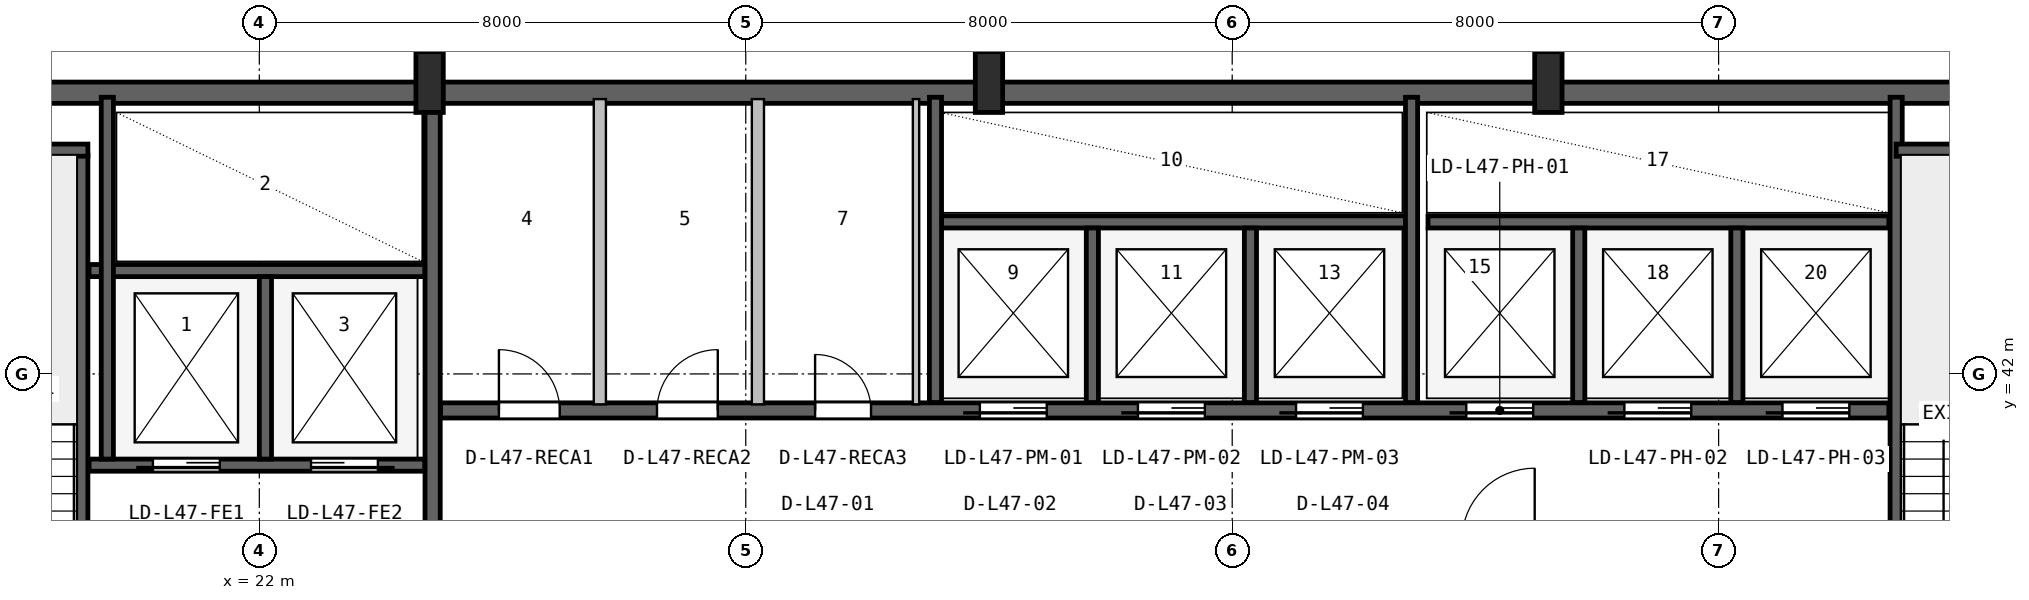
"""IFC4 building model, lengths in metres.
Left out: names, types, materials, properties, quantities, classifications, styles, units other than length and angle.
Written with IfcOpenShell. Run it as: python <this file> out.ifc"""

import sys

from ifc_helpers import new_model, si_unit, direction, frame, frame_2d, origin, origin_2d, place, context, subcontext, project, spatial, rectangle, i_section, extrude, source, transform, mapped, element, fill, save


model = new_model("IFC4")
c1 = context("Model", 3, precision=1e-05, world=origin(), true_north=direction((0.0, 1.0)))
c2 = subcontext(c1, "Body", "Model", "MODEL_VIEW")
j1 = project(units=[si_unit("LENGTHUNIT", "METRE"), si_unit("PLANEANGLEUNIT", "RADIAN")], contexts=[c1])
p1 = place(None, origin())
s1 = spatial("IfcSite", under=j1, at=p1, CompositionType="ELEMENT")
p2 = place(p1, origin())
s2 = spatial("IfcBuilding", under=s1, at=p2, CompositionType="ELEMENT")
p3 = place(p2, frame((0.0, 0.0, 191.4)))
s3 = spatial("IfcBuildingStorey", under=s2, at=p3, CompositionType="ELEMENT", Elevation=191.4)
p4 = place(p3, frame((15.6, 46.625, 0.0), z_axis=(0.0, 0.0, 1.0), x_axis=(1.0, 0.0, 0.0)))
e1 = element("IfcWall", 1, at=p4, inside=s3, PredefinedType="SHEAR", context=c2, shape_type="SweptSolid", body=[
    extrude(rectangle(XDim=36.8, YDim=0.35, at=frame_2d((18.4, 0.0))), origin(), (0.0, 0.0, 1.0), 4.35),
])
m1 = source(origin(), c2, "Body", "SweptSolid", [
    extrude(i_section(OverallWidth=0.45, OverallDepth=1.0, WebThickness=0.016, FlangeThickness=0.03, FilletRadius=0.016, at=origin_2d()), origin(), (0.0, 0.0, 1.0), 4.6),
])
for number, where, z_axis, x_axis in (
    (2, (24.8, 46.8, 0.0), (0.0, 0.0, 1.0), (1.0, 0.0, 0.0)),
    (3, (34.0, 46.8, 0.0), (0.0, 0.0, 1.0), (1.0, 0.0, 0.0)),
    (4, (43.2, 46.8, 0.0), (0.0, 0.0, 1.0), (1.0, 0.0, 0.0)),
):
    element("IfcColumn", number, at=place(p3, frame(where, z_axis=z_axis, x_axis=x_axis)), inside=s3, PredefinedType="COLUMN", context=c2, shape_type="MappedRepresentation", body=[
        mapped(m1, transform((0.0, 0.0, 0.0), x_axis=(1.0, 0.0, 0.0), y_axis=(0.0, 1.0, 0.0), z_axis=(0.0, 0.0, 1.0), scale=1.0)),
    ])
p5 = place(p3, frame((19.08, 35.95, 0.0), z_axis=(0.0, 0.0, 1.0), x_axis=(0.0, 1.0, 0.0)))
e5 = element("IfcWall", 5, at=p5, inside=s3, PredefinedType="SHEAR", context=c2, shape_type="SweptSolid", body=[
    extrude(rectangle(XDim=9.65, YDim=0.2, at=frame_2d((4.825, 0.0))), origin(), (0.0, 0.0, 1.0), 4.35),
])
p6 = place(p5, frame((0.25, 0.0, 0.0)))
e6 = element("IfcOpeningElement", 6, at=p6, cuts=e5, PredefinedType="OPENING", context=c2, shape_type="SweptSolid", body=[
    extrude(rectangle(XDim=0.95, YDim=2.1, at=frame_2d((0.475, 1.05))), frame((0.0, 0.11, 0.0), z_axis=(0.0, -1.0, 0.0), x_axis=(1.0, 0.0, 0.0)), (0.0, 0.0, 1.0), 0.22),
])
p7 = place(p3, frame((15.95, 45.68, 0.0), z_axis=(0.0, 0.0, 1.0), x_axis=(1.0, 0.0, 0.0)))
e7 = element("IfcWall", 7, at=p7, inside=s3, PredefinedType="SHEAR", context=c2, shape_type="SweptSolid", body=[
    extrude(rectangle(XDim=3.23, YDim=0.2, at=frame_2d((1.615, 0.0))), origin(), (0.0, 0.0, 1.0), 4.35),
])
p8 = place(p3, frame((24.85, 36.05, 0.0), z_axis=(0.0, 0.0, 1.0), x_axis=(0.0, 1.0, 0.0)))
e8 = element("IfcWall", 8, at=p8, inside=s3, PredefinedType="SHEAR", context=c2, shape_type="SweptSolid", body=[
    extrude(rectangle(XDim=10.45, YDim=0.25, at=frame_2d((5.225, 0.0))), origin(), (0.0, 0.0, 1.0), 4.35),
])
p9 = place(p3, frame((19.2, 40.5, 0.0), z_axis=(0.0, 0.0, 1.0), x_axis=(1.0, 0.0, 0.0)))
e9 = element("IfcWall", 9, at=p9, inside=s3, PredefinedType="SHEAR", context=c2, shape_type="SweptSolid", body=[
    extrude(rectangle(XDim=5.52, YDim=0.2, at=frame_2d((2.76, 0.0))), origin(), (0.0, 0.0, 1.0), 4.35),
])
p10 = place(p9, frame((1.05, 0.0, 0.0)))
e10 = element("IfcOpeningElement", 10, at=p10, cuts=e9, PredefinedType="OPENING", context=c2, shape_type="SweptSolid", body=[
    extrude(rectangle(XDim=1.1, YDim=2.18, at=frame_2d((0.55, 1.09))), frame((0.0, 0.11, 0.0), z_axis=(0.0, -1.0, 0.0), x_axis=(1.0, 0.0, 0.0)), (0.0, 0.0, 1.0), 0.22),
])
p11 = place(p9, frame((3.65, 0.0, 0.0)))
e11 = element("IfcOpeningElement", 11, at=p11, cuts=e9, PredefinedType="OPENING", context=c2, shape_type="SweptSolid", body=[
    extrude(rectangle(XDim=1.1, YDim=2.18, at=frame_2d((0.55, 1.09))), frame((0.0, 0.11, 0.0), z_axis=(0.0, -1.0, 0.0), x_axis=(1.0, 0.0, 0.0)), (0.0, 0.0, 1.0), 0.22),
])
p12 = place(p3, frame((19.2, 43.7, 0.0), z_axis=(0.0, 0.0, 1.0), x_axis=(1.0, 0.0, 0.0)))
e12 = element("IfcWall", 12, at=p12, inside=s3, PredefinedType="SHEAR", context=c2, shape_type="SweptSolid", body=[
    extrude(rectangle(XDim=5.52, YDim=0.2, at=frame_2d((2.76, 0.0))), origin(), (0.0, 0.0, 1.0), 4.35),
])
p13 = place(p3, frame((22.1, 40.6, 0.0), z_axis=(0.0, 0.0, 1.0), x_axis=(0.0, 1.0, 0.0)))
e13 = element("IfcWall", 13, at=p13, inside=s3, PredefinedType="SHEAR", context=c2, shape_type="SweptSolid", body=[
    extrude(rectangle(XDim=3.0, YDim=0.2, at=frame_2d((1.5, 0.0))), origin(), (0.0, 0.0, 1.0), 4.35),
])
p14 = place(p3, frame((19.5, 40.6, 0.0), z_axis=(0.0, 0.0, 1.0), x_axis=(0.0, 1.0, 0.0)))
e14 = element("IfcWall", 14, at=p14, inside=s3, PredefinedType="SHEAR", context=c2, shape_type="SweptSolid", body=[
    extrude(rectangle(XDim=5.95, YDim=0.2, at=frame_2d((2.975, 0.0))), origin(), (0.0, 0.0, 1.0), 4.35),
])
p15 = place(p3, frame((48.92, 36.05, 0.0), z_axis=(0.0, 0.0, 1.0), x_axis=(0.0, 1.0, 0.0)))
e15 = element("IfcWall", 15, at=p15, inside=s3, PredefinedType="SHEAR", context=c2, shape_type="SweptSolid", body=[
    extrude(rectangle(XDim=10.5, YDim=0.2, at=frame_2d((5.25, 0.0))), origin(), (0.0, 0.0, 1.0), 4.35),
])
p16 = place(p3, frame((48.92, 45.68, 0.0), z_axis=(0.0, 0.0, 1.0), x_axis=(1.0, 0.0, 0.0)))
e16 = element("IfcWall", 16, at=p16, inside=s3, PredefinedType="SHEAR", context=c2, shape_type="SweptSolid", body=[
    extrude(rectangle(XDim=3.18, YDim=0.2, at=frame_2d((1.59, 0.0))), origin(), (0.0, 0.0, 1.0), 4.35),
])
p17 = place(p3, frame((24.98, 41.4, 0.0), z_axis=(0.0, 0.0, 1.0), x_axis=(1.0, 0.0, 0.0)))
e17 = element("IfcWall", 17, at=p17, inside=s3, PredefinedType="SHEAR", context=c2, shape_type="SweptSolid", body=[
    extrude(rectangle(XDim=23.82, YDim=0.25, at=frame_2d((11.91, 0.0))), origin(), (0.0, 0.0, 1.0), 4.35),
])
p18 = place(p17, frame((8.87, 0.0, 0.0)))
e18 = element("IfcOpeningElement", 18, at=p18, cuts=e17, PredefinedType="OPENING", context=c2, shape_type="SweptSolid", body=[
    extrude(rectangle(XDim=1.1, YDim=2.18, at=frame_2d((0.55, 1.09))), frame((0.0, 0.135, 0.0), z_axis=(0.0, -1.0, 0.0), x_axis=(1.0, 0.0, 0.0)), (0.0, 0.0, 1.0), 0.27),
])
p19 = place(p17, frame((11.47, 0.0, 0.0)))
e19 = element("IfcOpeningElement", 19, at=p19, cuts=e17, PredefinedType="OPENING", context=c2, shape_type="SweptSolid", body=[
    extrude(rectangle(XDim=1.1, YDim=2.18, at=frame_2d((0.55, 1.09))), frame((0.0, 0.135, 0.0), z_axis=(0.0, -1.0, 0.0), x_axis=(1.0, 0.0, 0.0)), (0.0, 0.0, 1.0), 0.27),
])
p20 = place(p17, frame((14.07, 0.0, 0.0)))
e20 = element("IfcOpeningElement", 20, at=p20, cuts=e17, PredefinedType="OPENING", context=c2, shape_type="SweptSolid", body=[
    extrude(rectangle(XDim=1.1, YDim=2.18, at=frame_2d((0.55, 1.09))), frame((0.0, 0.135, 0.0), z_axis=(0.0, -1.0, 0.0), x_axis=(1.0, 0.0, 0.0)), (0.0, 0.0, 1.0), 0.27),
])
p21 = place(p17, frame((16.87, 0.0, 0.0)))
e21 = element("IfcOpeningElement", 21, at=p21, cuts=e17, PredefinedType="OPENING", context=c2, shape_type="SweptSolid", body=[
    extrude(rectangle(XDim=1.1, YDim=2.18, at=frame_2d((0.55, 1.09))), frame((0.0, 0.135, 0.0), z_axis=(0.0, -1.0, 0.0), x_axis=(1.0, 0.0, 0.0)), (0.0, 0.0, 1.0), 0.27),
])
p22 = place(p17, frame((19.47, 0.0, 0.0)))
e22 = element("IfcOpeningElement", 22, at=p22, cuts=e17, PredefinedType="OPENING", context=c2, shape_type="SweptSolid", body=[
    extrude(rectangle(XDim=1.1, YDim=2.18, at=frame_2d((0.55, 1.09))), frame((0.0, 0.135, 0.0), z_axis=(0.0, -1.0, 0.0), x_axis=(1.0, 0.0, 0.0)), (0.0, 0.0, 1.0), 0.27),
])
p23 = place(p17, frame((22.07, 0.0, 0.0)))
e23 = element("IfcOpeningElement", 23, at=p23, cuts=e17, PredefinedType="OPENING", context=c2, shape_type="SweptSolid", body=[
    extrude(rectangle(XDim=1.1, YDim=2.18, at=frame_2d((0.55, 1.09))), frame((0.0, 0.135, 0.0), z_axis=(0.0, -1.0, 0.0), x_axis=(1.0, 0.0, 0.0)), (0.0, 0.0, 1.0), 0.27),
])
p24 = place(p17, frame((0.96, 0.0, 0.0)))
e24 = element("IfcOpeningElement", 24, at=p24, cuts=e17, PredefinedType="OPENING", context=c2, shape_type="SweptSolid", body=[
    extrude(rectangle(XDim=1.0, YDim=2.08, at=frame_2d((0.5, 1.04))), frame((0.0, 0.135, 0.0), z_axis=(0.0, -1.0, 0.0), x_axis=(1.0, 0.0, 0.0)), (0.0, 0.0, 1.0), 0.27),
])
p25 = place(p17, frame((3.56, 0.0, 0.0)))
e25 = element("IfcOpeningElement", 25, at=p25, cuts=e17, PredefinedType="OPENING", context=c2, shape_type="SweptSolid", body=[
    extrude(rectangle(XDim=1.0, YDim=2.08, at=frame_2d((0.5, 1.04))), frame((0.0, 0.135, 0.0), z_axis=(0.0, -1.0, 0.0), x_axis=(1.0, 0.0, 0.0)), (0.0, 0.0, 1.0), 0.27),
])
p26 = place(p17, frame((6.16, 0.0, 0.0)))
e26 = element("IfcOpeningElement", 26, at=p26, cuts=e17, PredefinedType="OPENING", context=c2, shape_type="SweptSolid", body=[
    extrude(rectangle(XDim=0.92, YDim=2.08, at=frame_2d((0.46, 1.04))), frame((0.0, 0.135, 0.0), z_axis=(0.0, -1.0, 0.0), x_axis=(1.0, 0.0, 0.0)), (0.0, 0.0, 1.0), 0.27),
])
p27 = place(p3, frame((33.22, 44.5, 0.0), z_axis=(0.0, 0.0, 1.0), x_axis=(1.0, 0.0, 0.0)))
e27 = element("IfcWall", 27, at=p27, inside=s3, PredefinedType="SHEAR", context=c2, shape_type="SweptSolid", body=[
    extrude(rectangle(XDim=7.63, YDim=0.2, at=frame_2d((3.815, 0.0))), origin(), (0.0, 0.0, 1.0), 4.35),
])
p28 = place(p3, frame((33.12, 41.53, 0.0), z_axis=(0.0, 0.0, 1.0), x_axis=(0.0, 1.0, 0.0)))
e28 = element("IfcWall", 28, at=p28, inside=s3, PredefinedType="SHEAR", context=c2, shape_type="SweptSolid", body=[
    extrude(rectangle(XDim=5.02, YDim=0.2, at=frame_2d((2.51, 0.0))), origin(), (0.0, 0.0, 1.0), 4.35),
])
for number, where, z_axis, x_axis in (
    (29, (35.7, 41.53, 0.0), (0.0, 0.0, 1.0), (0.0, 1.0, 0.0)),
    (30, (38.3, 41.53, 0.0), (0.0, 0.0, 1.0), (0.0, 1.0, 0.0)),
):
    element("IfcWall", number, at=place(p3, frame(where, z_axis=z_axis, x_axis=x_axis)), inside=s3, PredefinedType="SHEAR", context=c2, shape_type="SweptSolid", body=[
        extrude(rectangle(XDim=2.87, YDim=0.2, at=frame_2d((1.435, 0.0))), origin(), (0.0, 0.0, 1.0), 4.35),
    ])
p29 = place(p3, frame((40.95, 41.53, 0.0), z_axis=(0.0, 0.0, 1.0), x_axis=(0.0, 1.0, 0.0)))
e31 = element("IfcWall", 31, at=p29, inside=s3, PredefinedType="SHEAR", context=c2, shape_type="SweptSolid", body=[
    extrude(rectangle(XDim=5.02, YDim=0.2, at=frame_2d((2.51, 0.0))), origin(), (0.0, 0.0, 1.0), 4.35),
])
p30 = place(p3, frame((41.22, 44.5, 0.0), z_axis=(0.0, 0.0, 1.0), x_axis=(1.0, 0.0, 0.0)))
e32 = element("IfcWall", 32, at=p30, inside=s3, PredefinedType="SHEAR", context=c2, shape_type="SweptSolid", body=[
    extrude(rectangle(XDim=7.58, YDim=0.2, at=frame_2d((3.79, 0.0))), origin(), (0.0, 0.0, 1.0), 4.35),
])
for number, where, z_axis, x_axis in (
    (33, (43.7, 41.53, 0.0), (0.0, 0.0, 1.0), (0.0, 1.0, 0.0)),
    (34, (46.3, 41.53, 0.0), (0.0, 0.0, 1.0), (0.0, 1.0, 0.0)),
):
    element("IfcWall", number, at=place(p3, frame(where, z_axis=z_axis, x_axis=x_axis)), inside=s3, PredefinedType="SHEAR", context=c2, shape_type="SweptSolid", body=[
        extrude(rectangle(XDim=2.87, YDim=0.2, at=frame_2d((1.435, 0.0))), origin(), (0.0, 0.0, 1.0), 4.35),
    ])
for number, where, z_axis, x_axis in (
    (35, (27.6, 41.5, 0.0), (0.0, 0.0, 1.0), (0.0, 1.0, 0.0)),
    (36, (30.2, 41.5, 0.0), (0.0, 0.0, 1.0), (0.0, 1.0, 0.0)),
):
    element("IfcWall", number, at=place(p3, frame(where, z_axis=z_axis, x_axis=x_axis)), inside=s3, PredefinedType="SOLIDWALL", context=c2, shape_type="SweptSolid", body=[
        extrude(rectangle(XDim=5.02, YDim=0.2, at=frame_2d((2.51, 0.0))), origin(), (0.0, 0.0, 1.0), 4.33),
    ])
p31 = place(p3, frame((32.8, 41.5, 0.0), z_axis=(0.0, 0.0, 1.0), x_axis=(0.0, 1.0, 0.0)))
e37 = element("IfcWall", 37, at=p31, inside=s3, PredefinedType="PARTITIONING", context=c2, shape_type="SweptSolid", body=[
    extrude(rectangle(XDim=5.02, YDim=0.105, at=frame_2d((2.51, 0.0))), origin(), (0.0, 0.0, 1.0), 4.33),
])
m2 = source(origin(), c2, "Body", "SweptSolid", [
    extrude(rectangle(XDim=1.1, YDim=2.18, at=frame_2d((0.55, 1.09))), frame((0.0, 0.025, 0.0), z_axis=(0.0, -1.0, 0.0), x_axis=(1.0, 0.0, 0.0)), (0.0, 0.0, 1.0), 0.05),
])
p32 = place(p10, frame((1.1, 0.0, 0.0), z_axis=(0.0, 0.0, 1.0), x_axis=(-1.0, 0.0, 0.0)))
e38 = element("IfcDoor", 38, at=p32, inside=s3, OperationType="SLIDING_TO_LEFT", PredefinedType="DOOR", context=c2, shape_type="MappedRepresentation", body=[
    mapped(m2, transform((0.0, 0.0, 0.0), x_axis=(1.0, 0.0, 0.0), y_axis=(0.0, 1.0, 0.0), z_axis=(0.0, 0.0, 1.0), scale=1.0)),
])
fill(e10, e38)
p33 = place(p11, frame((1.1, 0.0, 0.0), z_axis=(0.0, 0.0, 1.0), x_axis=(-1.0, 0.0, 0.0)))
e39 = element("IfcDoor", 39, at=p33, inside=s3, OperationType="SLIDING_TO_RIGHT", PredefinedType="DOOR", context=c2, shape_type="MappedRepresentation", body=[
    mapped(m2, transform((0.0, 0.0, 0.0), x_axis=(1.0, 0.0, 0.0), y_axis=(0.0, 1.0, 0.0), z_axis=(0.0, 0.0, 1.0), scale=1.0)),
])
fill(e11, e39)
p34 = place(p18, frame((1.1, 0.0, 0.0), z_axis=(0.0, 0.0, 1.0), x_axis=(-1.0, 0.0, 0.0)))
e40 = element("IfcDoor", 40, at=p34, inside=s3, OperationType="SLIDING_TO_LEFT", PredefinedType="DOOR", context=c2, shape_type="MappedRepresentation", body=[
    mapped(m2, transform((0.0, 0.0, 0.0), x_axis=(1.0, 0.0, 0.0), y_axis=(0.0, 1.0, 0.0), z_axis=(0.0, 0.0, 1.0), scale=1.0)),
])
fill(e18, e40)
p35 = place(p19, frame((1.1, 0.0, 0.0), z_axis=(0.0, 0.0, 1.0), x_axis=(-1.0, 0.0, 0.0)))
e41 = element("IfcDoor", 41, at=p35, inside=s3, OperationType="SLIDING_TO_LEFT", PredefinedType="DOOR", context=c2, shape_type="MappedRepresentation", body=[
    mapped(m2, transform((0.0, 0.0, 0.0), x_axis=(1.0, 0.0, 0.0), y_axis=(0.0, 1.0, 0.0), z_axis=(0.0, 0.0, 1.0), scale=1.0)),
])
fill(e19, e41)
p36 = place(p20, frame((1.1, 0.0, 0.0), z_axis=(0.0, 0.0, 1.0), x_axis=(-1.0, 0.0, 0.0)))
e42 = element("IfcDoor", 42, at=p36, inside=s3, OperationType="SLIDING_TO_LEFT", PredefinedType="DOOR", context=c2, shape_type="MappedRepresentation", body=[
    mapped(m2, transform((0.0, 0.0, 0.0), x_axis=(1.0, 0.0, 0.0), y_axis=(0.0, 1.0, 0.0), z_axis=(0.0, 0.0, 1.0), scale=1.0)),
])
fill(e20, e42)
p37 = place(p21, frame((1.1, 0.0, 0.0), z_axis=(0.0, 0.0, 1.0), x_axis=(-1.0, 0.0, 0.0)))
e43 = element("IfcDoor", 43, at=p37, inside=s3, OperationType="SLIDING_TO_LEFT", PredefinedType="DOOR", context=c2, shape_type="MappedRepresentation", body=[
    mapped(m2, transform((0.0, 0.0, 0.0), x_axis=(1.0, 0.0, 0.0), y_axis=(0.0, 1.0, 0.0), z_axis=(0.0, 0.0, 1.0), scale=1.0)),
])
fill(e21, e43)
p38 = place(p22, frame((1.1, 0.0, 0.0), z_axis=(0.0, 0.0, 1.0), x_axis=(-1.0, 0.0, 0.0)))
e44 = element("IfcDoor", 44, at=p38, inside=s3, OperationType="SLIDING_TO_LEFT", PredefinedType="DOOR", context=c2, shape_type="MappedRepresentation", body=[
    mapped(m2, transform((0.0, 0.0, 0.0), x_axis=(1.0, 0.0, 0.0), y_axis=(0.0, 1.0, 0.0), z_axis=(0.0, 0.0, 1.0), scale=1.0)),
])
fill(e22, e44)
p39 = place(p23, frame((1.1, 0.0, 0.0), z_axis=(0.0, 0.0, 1.0), x_axis=(-1.0, 0.0, 0.0)))
e45 = element("IfcDoor", 45, at=p39, inside=s3, OperationType="SLIDING_TO_LEFT", PredefinedType="DOOR", context=c2, shape_type="MappedRepresentation", body=[
    mapped(m2, transform((0.0, 0.0, 0.0), x_axis=(1.0, 0.0, 0.0), y_axis=(0.0, 1.0, 0.0), z_axis=(0.0, 0.0, 1.0), scale=1.0)),
])
fill(e23, e45)
m3 = source(origin(), c2, "Body", "SweptSolid", [
    extrude(rectangle(XDim=1.0, YDim=2.08, at=frame_2d((0.5, 1.04))), frame((0.0, 0.025, 0.0), z_axis=(0.0, -1.0, 0.0), x_axis=(1.0, 0.0, 0.0)), (0.0, 0.0, 1.0), 0.05),
])
p40 = place(p24, origin())
e46 = element("IfcDoor", 46, at=p40, inside=s3, OperationType="SINGLE_SWING_LEFT", PredefinedType="DOOR", context=c2, shape_type="MappedRepresentation", body=[
    mapped(m3, transform((0.0, 0.0, 0.0), x_axis=(1.0, 0.0, 0.0), y_axis=(0.0, 1.0, 0.0), z_axis=(0.0, 0.0, 1.0), scale=1.0)),
])
fill(e24, e46)
p41 = place(p25, origin())
e47 = element("IfcDoor", 47, at=p41, inside=s3, OperationType="SINGLE_SWING_RIGHT", PredefinedType="DOOR", context=c2, shape_type="MappedRepresentation", body=[
    mapped(m3, transform((0.0, 0.0, 0.0), x_axis=(1.0, 0.0, 0.0), y_axis=(0.0, 1.0, 0.0), z_axis=(0.0, 0.0, 1.0), scale=1.0)),
])
fill(e25, e47)
m4 = source(origin(), c2, "Body", "SweptSolid", [
    extrude(rectangle(XDim=0.92, YDim=2.08, at=frame_2d((0.46, 1.04))), frame((0.0, 0.025, 0.0), z_axis=(0.0, -1.0, 0.0), x_axis=(1.0, 0.0, 0.0)), (0.0, 0.0, 1.0), 0.05),
])
p42 = place(p26, origin())
e48 = element("IfcDoor", 48, at=p42, inside=s3, OperationType="SINGLE_SWING_LEFT", PredefinedType="DOOR", context=c2, shape_type="MappedRepresentation", body=[
    mapped(m4, transform((0.0, 0.0, 0.0), x_axis=(1.0, 0.0, 0.0), y_axis=(0.0, 1.0, 0.0), z_axis=(0.0, 0.0, 1.0), scale=1.0)),
])
fill(e26, e48)
save(model, sys.argv[1])
